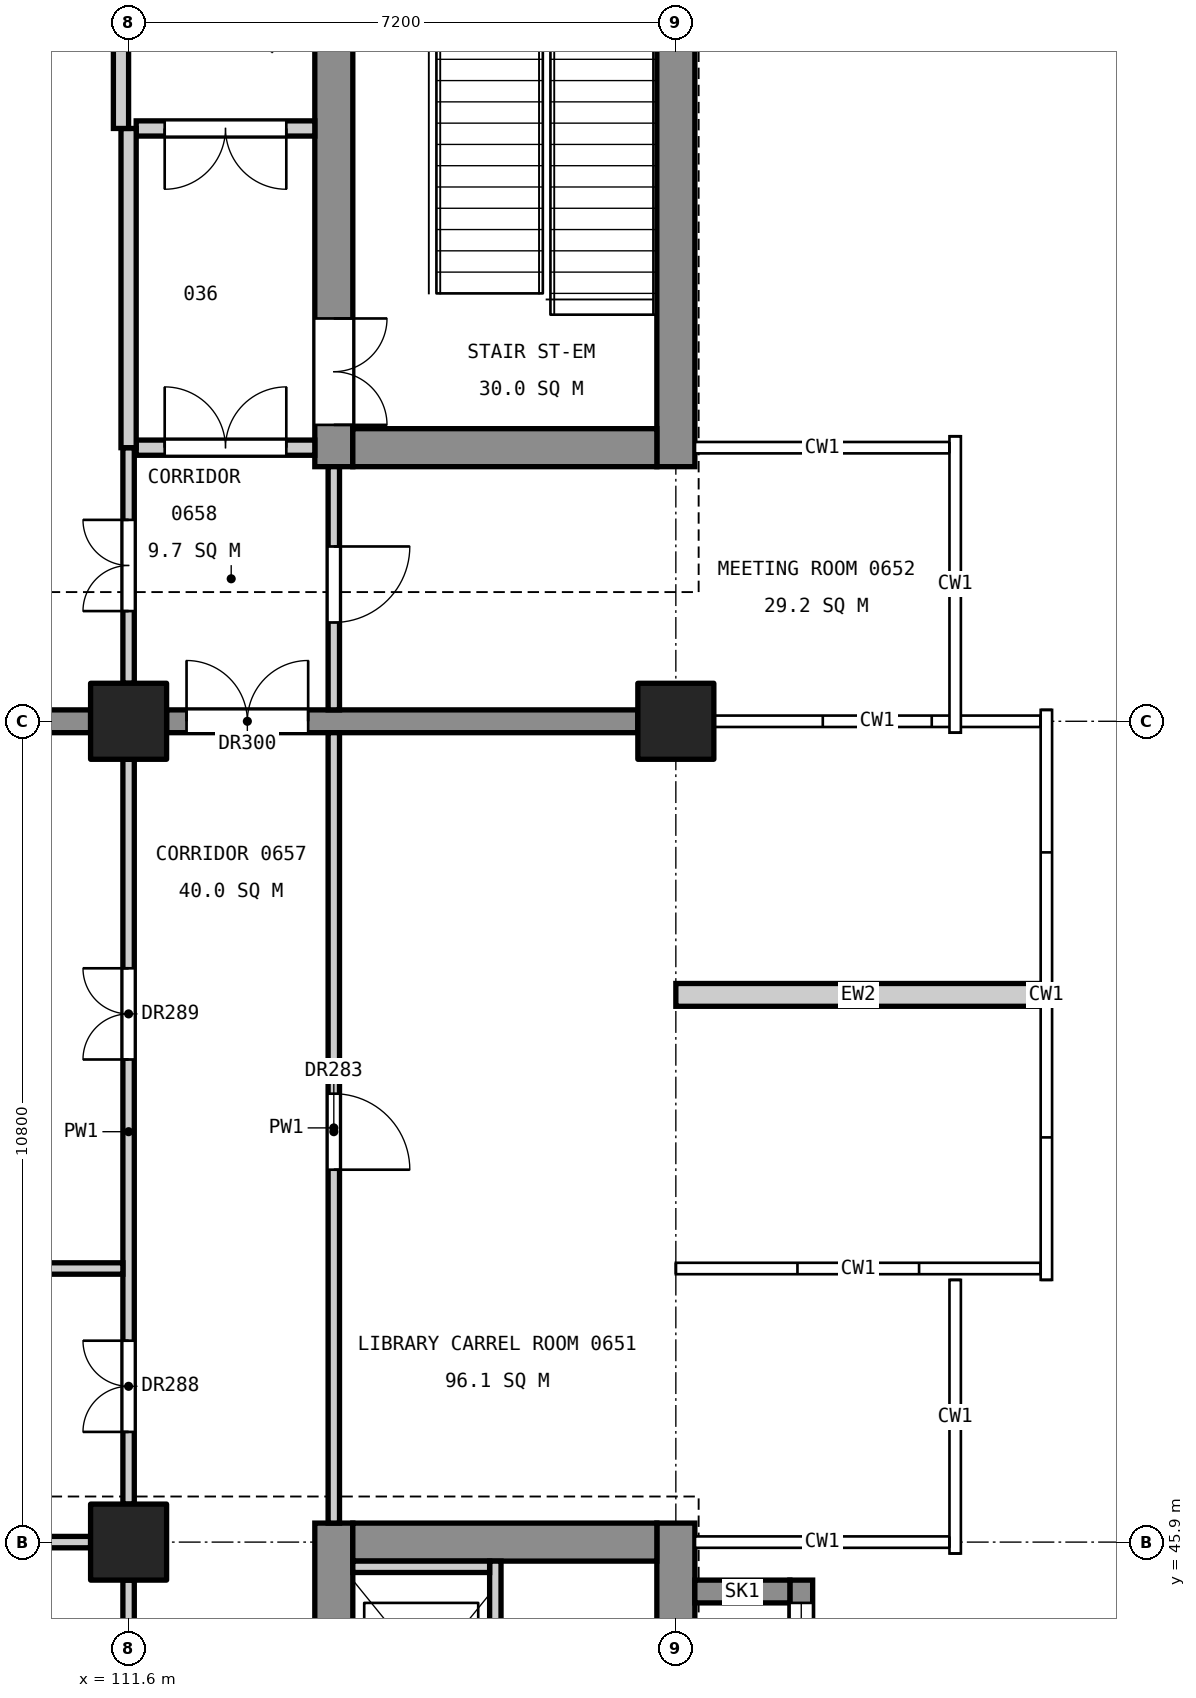
"""IFC4 building model, lengths in metres.
Left out: names, types, materials, properties, quantities, classifications, styles, units other than length and angle.
Written with IfcOpenShell. Run it as: python <this file> out.ifc"""

import sys

from ifc_helpers import new_model, si_unit, direction, frame, frame_2d, origin, origin_2d, place, context, subcontext, project, spatial, rectangle, extrude, element, fill, save


model = new_model("IFC4")
c1 = context("Model", 3, precision=1e-05, world=origin(), true_north=direction((0.0, 1.0)))
c2 = subcontext(c1, "Body", "Model", "MODEL_VIEW")
j1 = project(units=[si_unit("LENGTHUNIT", "METRE"), si_unit("PLANEANGLEUNIT", "RADIAN")], contexts=[c1])
p1 = place(None, origin())
s1 = spatial("IfcSite", under=j1, at=p1, CompositionType="ELEMENT")
p2 = place(p1, origin())
s2 = spatial("IfcBuilding", under=s1, at=p2, CompositionType="ELEMENT")
p3 = place(p2, frame((0.0, 0.0, 31.8)))
s3 = spatial("IfcBuildingStorey", under=s2, at=p3, CompositionType="ELEMENT", Elevation=31.8)
for number, where, z_axis, x_axis in (
    (1, (118.8, 56.7, 0.0), (0.0, 0.0, 1.0), (1.0, 0.0, 0.0)),
    (2, (111.6, 45.9, 0.0), (0.0, 0.0, 1.0), (1.0, 0.0, 0.0)),
    (3, (111.6, 56.7, 0.0), (0.0, 0.0, 1.0), (1.0, 0.0, 0.0)),
):
    element("IfcColumn", number, at=place(p3, frame(where, z_axis=z_axis, x_axis=x_axis)), inside=s3, PredefinedType="COLUMN", context=c2, shape_type="SweptSolid", body=[
        extrude(rectangle(XDim=1.0, YDim=1.0, at=origin_2d()), origin(), (0.0, 0.0, 1.0), 4.8),
    ])
p4 = place(p3, frame((118.8, 34.85, 0.0), z_axis=(0.0, 0.0, 1.0), x_axis=(0.0, 1.0, 0.0)))
e4 = element("IfcWall", 4, at=p4, inside=s3, PredefinedType="SHEAR", context=c2, shape_type="SweptSolid", body=[
    extrude(rectangle(XDim=11.3, YDim=0.5, at=frame_2d((5.65, 0.0))), origin(), (0.0, 0.0, 1.0), 4.55),
])
p5 = place(p4, frame((6.16, 0.0, 3.4)))
e5 = element("IfcOpeningElement", 5, at=p5, cuts=e4, PredefinedType="OPENING", context=c2, shape_type="SweptSolid", body=[
    extrude(rectangle(XDim=1.2, YDim=0.9, at=frame_2d((0.6, 0.45))), frame((0.0, 0.26, 0.0), z_axis=(0.0, -1.0, 0.0), x_axis=(1.0, 0.0, 0.0)), (0.0, 0.0, 1.0), 0.52),
])
p6 = place(p3, frame((114.3, 34.85, 0.0), z_axis=(0.0, 0.0, 1.0), x_axis=(0.0, 1.0, 0.0)))
e6 = element("IfcWall", 6, at=p6, inside=s3, PredefinedType="SHEAR", context=c2, shape_type="SweptSolid", body=[
    extrude(rectangle(XDim=11.3, YDim=0.5, at=frame_2d((5.65, 0.0))), origin(), (0.0, 0.0, 1.0), 4.55),
])
p7 = place(p6, frame((0.55, 0.0, 0.0)))
e7 = element("IfcOpeningElement", 7, at=p7, cuts=e6, PredefinedType="OPENING", context=c2, shape_type="SweptSolid", body=[
    extrude(rectangle(XDim=1.4, YDim=2.1, at=frame_2d((0.7, 1.05))), frame((0.0, 0.26, 0.0), z_axis=(0.0, -1.0, 0.0), x_axis=(1.0, 0.0, 0.0)), (0.0, 0.0, 1.0), 0.52),
])
p8 = place(p6, frame((8.8, 0.0, 0.0)))
e8 = element("IfcOpeningElement", 8, at=p8, cuts=e6, PredefinedType="OPENING", context=c2, shape_type="SweptSolid", body=[
    extrude(rectangle(XDim=1.1, YDim=2.1, at=frame_2d((0.55, 1.05))), frame((0.0, 0.26, 0.0), z_axis=(0.0, -1.0, 0.0), x_axis=(1.0, 0.0, 0.0)), (0.0, 0.0, 1.0), 0.52),
])
p9 = place(p3, frame((118.55, 45.9, 0.0), z_axis=(0.0, 0.0, 1.0), x_axis=(-1.0, 0.0, 0.0)))
e9 = element("IfcWall", 9, at=p9, inside=s3, PredefinedType="SHEAR", context=c2, shape_type="SweptSolid", body=[
    extrude(rectangle(XDim=4.0, YDim=0.5, at=frame_2d((2.0, 0.0))), origin(), (0.0, 0.0, 1.0), 4.55),
])
p10 = place(p3, frame((118.8, 60.05, 0.0), z_axis=(0.0, 0.0, 1.0), x_axis=(0.0, 1.0, 0.0)))
e10 = element("IfcWall", 10, at=p10, inside=s3, PredefinedType="SHEAR", context=c2, shape_type="SweptSolid", body=[
    extrude(rectangle(XDim=14.9, YDim=0.5, at=frame_2d((7.45, 0.0))), origin(), (0.0, 0.0, 1.0), 4.55),
])
p11 = place(p10, frame((6.16, 0.0, 3.4)))
e11 = element("IfcOpeningElement", 11, at=p11, cuts=e10, PredefinedType="OPENING", context=c2, shape_type="SweptSolid", body=[
    extrude(rectangle(XDim=1.2, YDim=0.9, at=frame_2d((0.6, 0.45))), frame((0.0, 0.26, 0.0), z_axis=(0.0, -1.0, 0.0), x_axis=(1.0, 0.0, 0.0)), (0.0, 0.0, 1.0), 0.52),
])
p12 = place(p3, frame((114.3, 60.05, 0.0), z_axis=(0.0, 0.0, 1.0), x_axis=(0.0, 1.0, 0.0)))
e12 = element("IfcWall", 12, at=p12, inside=s3, PredefinedType="SHEAR", context=c2, shape_type="SweptSolid", body=[
    extrude(rectangle(XDim=14.9, YDim=0.5, at=frame_2d((7.45, 0.0))), origin(), (0.0, 0.0, 1.0), 4.55),
])
p13 = place(p12, frame((0.55, 0.0, 0.0)))
e13 = element("IfcOpeningElement", 13, at=p13, cuts=e12, PredefinedType="OPENING", context=c2, shape_type="SweptSolid", body=[
    extrude(rectangle(XDim=1.4, YDim=2.1, at=frame_2d((0.7, 1.05))), frame((0.0, 0.26, 0.0), z_axis=(0.0, -1.0, 0.0), x_axis=(1.0, 0.0, 0.0)), (0.0, 0.0, 1.0), 0.52),
])
p14 = place(p12, frame((8.85, 0.0, 0.0)))
e14 = element("IfcOpeningElement", 14, at=p14, cuts=e12, PredefinedType="OPENING", context=c2, shape_type="SweptSolid", body=[
    extrude(rectangle(XDim=1.1, YDim=2.1, at=frame_2d((0.55, 1.05))), frame((0.0, 0.26, 0.0), z_axis=(0.0, -1.0, 0.0), x_axis=(1.0, 0.0, 0.0)), (0.0, 0.0, 1.0), 0.52),
])
p15 = place(p12, frame((11.4, 0.0, 0.0)))
e15 = element("IfcOpeningElement", 15, at=p15, cuts=e12, PredefinedType="OPENING", context=c2, shape_type="SweptSolid", body=[
    extrude(rectangle(XDim=1.1, YDim=2.1, at=frame_2d((0.55, 1.05))), frame((0.0, 0.26, 0.0), z_axis=(0.0, -1.0, 0.0), x_axis=(1.0, 0.0, 0.0)), (0.0, 0.0, 1.0), 0.52),
])
p16 = place(p3, frame((118.55, 60.3, 0.0), z_axis=(0.0, 0.0, 1.0), x_axis=(-1.0, 0.0, 0.0)))
e16 = element("IfcWall", 16, at=p16, inside=s3, PredefinedType="SHEAR", context=c2, shape_type="SweptSolid", body=[
    extrude(rectangle(XDim=4.0, YDim=0.5, at=frame_2d((2.0, 0.0))), origin(), (0.0, 0.0, 1.0), 4.55),
])
p17 = place(p3, frame((120.45, 43.0, 0.0), z_axis=(0.0, 0.0, 1.0), x_axis=(0.0, 1.0, 0.0)))
e17 = element("IfcWall", 17, at=p17, inside=s3, PredefinedType="SHEAR", context=c2, shape_type="SweptSolid", body=[
    extrude(rectangle(XDim=2.4, YDim=0.3, at=frame_2d((1.2, 0.0))), origin(), (0.0, 0.0, 1.0), 4.8),
])
p18 = place(p17, frame((0.3, 0.0, 3.0)))
e18 = element("IfcOpeningElement", 18, at=p18, cuts=e17, PredefinedType="OPENING", context=c2, shape_type="SweptSolid", body=[
    extrude(rectangle(XDim=1.8, YDim=1.2, at=frame_2d((0.9, 0.6))), frame((0.0, 0.16, 0.0), z_axis=(0.0, -1.0, 0.0), x_axis=(1.0, 0.0, 0.0)), (0.0, 0.0, 1.0), 0.32),
])
p19 = place(p3, frame((119.05, 45.25, 0.0), z_axis=(0.0, 0.0, 1.0), x_axis=(1.0, 0.0, 0.0)))
e19 = element("IfcWall", 19, at=p19, inside=s3, PredefinedType="SHEAR", context=c2, shape_type="SweptSolid", body=[
    extrude(rectangle(XDim=1.25, YDim=0.3, at=frame_2d((0.625, 0.0))), origin(), (0.0, 0.0, 1.0), 4.8),
])
p20 = place(p3, frame((118.3, 56.7, 0.0), z_axis=(0.0, 0.0, 1.0), x_axis=(-1.0, 0.0, 0.0)))
e20 = element("IfcWall", 20, at=p20, inside=s3, PredefinedType="SHEAR", context=c2, shape_type="SweptSolid", body=[
    extrude(rectangle(XDim=6.2, YDim=0.3, at=frame_2d((3.1, 0.0))), origin(), (0.0, 0.0, 1.0), 4.55),
])
p21 = place(p20, frame((4.337, 0.0, 0.0)))
e21 = element("IfcOpeningElement", 21, at=p21, cuts=e20, PredefinedType="OPENING", context=c2, shape_type="SweptSolid", body=[
    extrude(rectangle(XDim=1.6, YDim=2.1, at=frame_2d((0.8, 1.05))), frame((0.0, 0.16, 0.0), z_axis=(0.0, -1.0, 0.0), x_axis=(1.0, 0.0, 0.0)), (0.0, 0.0, 1.0), 0.32),
])
p22 = place(p3, frame((111.1, 56.7, 0.0), z_axis=(0.0, 0.0, 1.0), x_axis=(-1.0, 0.0, 0.0)))
e22 = element("IfcWall", 22, at=p22, inside=s3, PredefinedType="SHEAR", context=c2, shape_type="SweptSolid", body=[
    extrude(rectangle(XDim=9.8, YDim=0.3, at=frame_2d((4.9, 0.0))), origin(), (0.0, 0.0, 1.0), 4.55),
])
p23 = place(p3, frame((116.425, 43.0, 0.0), z_axis=(0.0, 0.0, 1.0), x_axis=(0.0, 1.0, 0.0)))
e23 = element("IfcWall", 23, at=p23, inside=s3, PredefinedType="SOLIDWALL", context=c2, shape_type="SweptSolid", body=[
    extrude(rectangle(XDim=2.65, YDim=0.15, at=frame_2d((1.325, 0.0))), origin(), (0.0, 0.0, 1.0), 4.8),
])
p24 = place(p3, frame((116.35, 45.575, 0.0), z_axis=(0.0, 0.0, 1.0), x_axis=(-1.0, 0.0, 0.0)))
e24 = element("IfcWall", 24, at=p24, inside=s3, PredefinedType="SOLIDWALL", context=c2, shape_type="SweptSolid", body=[
    extrude(rectangle(XDim=1.8, YDim=0.15, at=frame_2d((0.9, 0.0))), origin(), (0.0, 0.0, 1.0), 4.8),
])
p25 = place(p3, frame((123.6, 53.1, 0.0), z_axis=(0.0, 0.0, 1.0), x_axis=(-1.0, 0.0, 0.0)))
e25 = element("IfcWall", 25, at=p25, inside=s3, PredefinedType="STANDARD", context=c2, shape_type="SweptSolid", body=[
    extrude(rectangle(XDim=4.8, YDim=0.3, at=frame_2d((2.4, 0.0))), origin(), (0.0, 0.0, 1.0), 3.65),
])
p26 = place(p3, frame((114.3, 46.15, 0.0), z_axis=(0.0, 0.0, 1.0), x_axis=(0.0, 1.0, 0.0)))
e26 = element("IfcWall", 26, at=p26, inside=s3, PredefinedType="PARTITIONING", context=c2, shape_type="SweptSolid", body=[
    extrude(rectangle(XDim=10.4, YDim=0.15, at=frame_2d((5.2, 0.0))), origin(), (0.0, 0.0, 1.0), 3.55),
])
p27 = place(p26, frame((4.65, 0.0, 0.0)))
e27 = element("IfcOpeningElement", 27, at=p27, cuts=e26, PredefinedType="OPENING", context=c2, shape_type="SweptSolid", body=[
    extrude(rectangle(XDim=1.0, YDim=2.1, at=frame_2d((0.5, 1.05))), frame((0.0, 0.085, 0.0), z_axis=(0.0, -1.0, 0.0), x_axis=(1.0, 0.0, 0.0)), (0.0, 0.0, 1.0), 0.17),
])
p28 = place(p3, frame((114.3, 56.85, 0.0), z_axis=(0.0, 0.0, 1.0), x_axis=(0.0, 1.0, 0.0)))
e28 = element("IfcWall", 28, at=p28, inside=s3, PredefinedType="PARTITIONING", context=c2, shape_type="SweptSolid", body=[
    extrude(rectangle(XDim=3.2, YDim=0.15, at=frame_2d((1.6, 0.0))), origin(), (0.0, 0.0, 1.0), 3.55),
])
p29 = place(p28, frame((1.15, 0.0, 0.0)))
e29 = element("IfcOpeningElement", 29, at=p29, cuts=e28, PredefinedType="OPENING", context=c2, shape_type="SweptSolid", body=[
    extrude(rectangle(XDim=1.0, YDim=2.1, at=frame_2d((0.5, 1.05))), frame((0.0, 0.085, 0.0), z_axis=(0.0, -1.0, 0.0), x_axis=(1.0, 0.0, 0.0)), (0.0, 0.0, 1.0), 0.17),
])
p30 = place(p3, frame((114.05, 60.3, 0.0), z_axis=(0.0, 0.0, 1.0), x_axis=(-1.0, 0.0, 0.0)))
e30 = element("IfcWall", 30, at=p30, inside=s3, PredefinedType="PARTITIONING", context=c2, shape_type="SweptSolid", body=[
    extrude(rectangle(XDim=2.35, YDim=0.2, at=frame_2d((1.175, 0.0))), origin(), (0.0, 0.0, 1.0), 3.85),
])
p31 = place(p30, frame((0.375, 0.0, 0.0)))
e31 = element("IfcOpeningElement", 31, at=p31, cuts=e30, PredefinedType="OPENING", context=c2, shape_type="SweptSolid", body=[
    extrude(rectangle(XDim=1.6, YDim=2.1, at=frame_2d((0.8, 1.05))), frame((0.0, 0.11, 0.0), z_axis=(0.0, -1.0, 0.0), x_axis=(1.0, 0.0, 0.0)), (0.0, 0.0, 1.0), 0.22),
])
p32 = place(p3, frame((114.05, 64.5, 0.0), z_axis=(0.0, 0.0, 1.0), x_axis=(-1.0, 0.0, 0.0)))
e32 = element("IfcWall", 32, at=p32, inside=s3, PredefinedType="PARTITIONING", context=c2, shape_type="SweptSolid", body=[
    extrude(rectangle(XDim=2.35, YDim=0.2, at=frame_2d((1.175, 0.0))), origin(), (0.0, 0.0, 1.0), 3.55),
])
p33 = place(p32, frame((0.375, 0.0, 0.0)))
e33 = element("IfcOpeningElement", 33, at=p33, cuts=e32, PredefinedType="OPENING", context=c2, shape_type="SweptSolid", body=[
    extrude(rectangle(XDim=1.6, YDim=2.1, at=frame_2d((0.8, 1.05))), frame((0.0, 0.11, 0.0), z_axis=(0.0, -1.0, 0.0), x_axis=(1.0, 0.0, 0.0)), (0.0, 0.0, 1.0), 0.22),
])
p34 = place(p3, frame((111.6, 41.9, 0.0), z_axis=(0.0, 0.0, 1.0), x_axis=(0.0, 1.0, 0.0)))
e34 = element("IfcWall", 34, at=p34, inside=s3, PredefinedType="PARTITIONING", context=c2, shape_type="SweptSolid", body=[
    extrude(rectangle(XDim=3.5, YDim=0.15, at=frame_2d((1.75, 0.0))), origin(), (0.0, 0.0, 1.0), 3.55),
])
p35 = place(p34, frame((1.15, 0.0, 0.0)))
e35 = element("IfcOpeningElement", 35, at=p35, cuts=e34, PredefinedType="OPENING", context=c2, shape_type="SweptSolid", body=[
    extrude(rectangle(XDim=1.2, YDim=2.1, at=frame_2d((0.6, 1.05))), frame((0.0, 0.085, 0.0), z_axis=(0.0, -1.0, 0.0), x_axis=(1.0, 0.0, 0.0)), (0.0, 0.0, 1.0), 0.17),
])
p36 = place(p3, frame((111.6, 46.4, 0.0), z_axis=(0.0, 0.0, 1.0), x_axis=(0.0, 1.0, 0.0)))
e36 = element("IfcWall", 36, at=p36, inside=s3, PredefinedType="PARTITIONING", context=c2, shape_type="SweptSolid", body=[
    extrude(rectangle(XDim=9.8, YDim=0.15, at=frame_2d((4.9, 0.0))), origin(), (0.0, 0.0, 1.0), 3.55),
])
p37 = place(p36, frame((0.95, 0.0, 0.0)))
e37 = element("IfcOpeningElement", 37, at=p37, cuts=e36, PredefinedType="OPENING", context=c2, shape_type="SweptSolid", body=[
    extrude(rectangle(XDim=1.2, YDim=2.1, at=frame_2d((0.6, 1.05))), frame((0.0, 0.085, 0.0), z_axis=(0.0, -1.0, 0.0), x_axis=(1.0, 0.0, 0.0)), (0.0, 0.0, 1.0), 0.17),
])
p38 = place(p36, frame((5.85, 0.0, 0.0)))
e38 = element("IfcOpeningElement", 38, at=p38, cuts=e36, PredefinedType="OPENING", context=c2, shape_type="SweptSolid", body=[
    extrude(rectangle(XDim=1.2, YDim=2.1, at=frame_2d((0.6, 1.05))), frame((0.0, 0.085, 0.0), z_axis=(0.0, -1.0, 0.0), x_axis=(1.0, 0.0, 0.0)), (0.0, 0.0, 1.0), 0.17),
])
p39 = place(p3, frame((111.6, 57.2, 0.0), z_axis=(0.0, 0.0, 1.0), x_axis=(0.0, 1.0, 0.0)))
e39 = element("IfcWall", 39, at=p39, inside=s3, PredefinedType="PARTITIONING", context=c2, shape_type="SweptSolid", body=[
    extrude(rectangle(XDim=3.1, YDim=0.15, at=frame_2d((1.55, 0.0))), origin(), (0.0, 0.0, 1.0), 3.55),
])
p40 = place(p39, frame((0.95, 0.0, 0.0)))
e40 = element("IfcOpeningElement", 40, at=p40, cuts=e39, PredefinedType="OPENING", context=c2, shape_type="SweptSolid", body=[
    extrude(rectangle(XDim=1.2, YDim=2.1, at=frame_2d((0.6, 1.05))), frame((0.0, 0.085, 0.0), z_axis=(0.0, -1.0, 0.0), x_axis=(1.0, 0.0, 0.0)), (0.0, 0.0, 1.0), 0.17),
])
p41 = place(p3, frame((111.6, 60.3, 0.0), z_axis=(0.0, 0.0, 1.0), x_axis=(0.0, 1.0, 0.0)))
e41 = element("IfcWall", 41, at=p41, inside=s3, PredefinedType="PARTITIONING", context=c2, shape_type="SweptSolid", body=[
    extrude(rectangle(XDim=4.2, YDim=0.2, at=frame_2d((2.1, 0.0))), origin(), (0.0, 0.0, 1.0), 3.55),
])
p42 = place(p3, frame((111.5, 64.5, 0.0), z_axis=(0.0, 0.0, 1.0), x_axis=(0.0, 1.0, 0.0)))
e42 = element("IfcWall", 42, at=p42, inside=s3, PredefinedType="PARTITIONING", context=c2, shape_type="SweptSolid", body=[
    extrude(rectangle(XDim=2.5, YDim=0.2, at=frame_2d((1.25, 0.0))), origin(), (0.0, 0.0, 1.0), 3.55),
])
p43 = place(p3, frame((111.1, 45.9, 0.0), z_axis=(0.0, 0.0, 1.0), x_axis=(-1.0, 0.0, 0.0)))
e43 = element("IfcWall", 43, at=p43, inside=s3, PredefinedType="PARTITIONING", context=c2, shape_type="SweptSolid", body=[
    extrude(rectangle(XDim=9.8, YDim=0.15, at=frame_2d((4.9, 0.0))), origin(), (0.0, 0.0, 1.0), 3.85),
])
p44 = place(p3, frame((111.525, 49.5, 0.0), z_axis=(0.0, 0.0, 1.0), x_axis=(-1.0, 0.0, 0.0)))
e44 = element("IfcWall", 44, at=p44, inside=s3, PredefinedType="PARTITIONING", context=c2, shape_type="SweptSolid", body=[
    extrude(rectangle(XDim=10.575, YDim=0.15, at=frame_2d((5.288, 0.0))), origin(), (0.0, 0.0, 1.0), 3.85),
])
p45 = place(p13, frame((1.4, 0.0, 0.0), z_axis=(0.0, 0.0, 1.0), x_axis=(-1.0, 0.0, 0.0)))
e45 = element("IfcDoor", 45, at=p45, inside=s3, OperationType="DOUBLE_DOOR_SINGLE_SWING", PredefinedType="DOOR", context=c2, shape_type="SweptSolid", body=[
    extrude(rectangle(XDim=1.4, YDim=2.1, at=frame_2d((0.7, 1.05))), frame((0.0, 0.025, 0.0), z_axis=(0.0, -1.0, 0.0), x_axis=(1.0, 0.0, 0.0)), (0.0, 0.0, 1.0), 0.05),
])
fill(e13, e45)
p46 = place(p18, origin())
e46 = element("IfcWindow", 46, at=p46, inside=s3, PartitioningType="SINGLE_PANEL", PredefinedType="WINDOW", context=c2, shape_type="SweptSolid", body=[
    extrude(rectangle(XDim=1.8, YDim=1.2, at=frame_2d((0.9, 0.6))), frame((0.0, 0.03, 0.0), z_axis=(0.0, -1.0, 0.0), x_axis=(1.0, 0.0, 0.0)), (0.0, 0.0, 1.0), 0.06),
])
fill(e18, e46)
p47 = place(p27, frame((1.0, 0.0, 0.0), z_axis=(0.0, 0.0, 1.0), x_axis=(-1.0, 0.0, 0.0)))
e47 = element("IfcDoor", 47, at=p47, inside=s3, OperationType="SINGLE_SWING_RIGHT", PredefinedType="DOOR", context=c2, shape_type="SweptSolid", body=[
    extrude(rectangle(XDim=1.0, YDim=2.1, at=frame_2d((0.5, 1.05))), frame((0.0, 0.025, 0.0), z_axis=(0.0, -1.0, 0.0), x_axis=(1.0, 0.0, 0.0)), (0.0, 0.0, 1.0), 0.05),
])
fill(e27, e47)
p48 = place(p29, frame((1.0, 0.0, 0.0), z_axis=(0.0, 0.0, 1.0), x_axis=(-1.0, 0.0, 0.0)))
e48 = element("IfcDoor", 48, at=p48, inside=s3, OperationType="SINGLE_SWING_LEFT", PredefinedType="DOOR", context=c2, shape_type="SweptSolid", body=[
    extrude(rectangle(XDim=1.0, YDim=2.1, at=frame_2d((0.5, 1.05))), frame((0.0, 0.025, 0.0), z_axis=(0.0, -1.0, 0.0), x_axis=(1.0, 0.0, 0.0)), (0.0, 0.0, 1.0), 0.05),
])
fill(e29, e48)
p49 = place(p37, origin())
e49 = element("IfcDoor", 49, at=p49, inside=s3, OperationType="DOUBLE_DOOR_SINGLE_SWING", PredefinedType="DOOR", context=c2, shape_type="SweptSolid", body=[
    extrude(rectangle(XDim=1.2, YDim=2.1, at=frame_2d((0.6, 1.05))), frame((0.0, 0.025, 0.0), z_axis=(0.0, -1.0, 0.0), x_axis=(1.0, 0.0, 0.0)), (0.0, 0.0, 1.0), 0.05),
])
fill(e37, e49)
p50 = place(p38, origin())
e50 = element("IfcDoor", 50, at=p50, inside=s3, OperationType="DOUBLE_DOOR_SINGLE_SWING", PredefinedType="DOOR", context=c2, shape_type="SweptSolid", body=[
    extrude(rectangle(XDim=1.2, YDim=2.1, at=frame_2d((0.6, 1.05))), frame((0.0, 0.025, 0.0), z_axis=(0.0, -1.0, 0.0), x_axis=(1.0, 0.0, 0.0)), (0.0, 0.0, 1.0), 0.05),
])
fill(e38, e50)
p51 = place(p40, origin())
e51 = element("IfcDoor", 51, at=p51, inside=s3, OperationType="DOUBLE_DOOR_SINGLE_SWING", PredefinedType="DOOR", context=c2, shape_type="SweptSolid", body=[
    extrude(rectangle(XDim=1.2, YDim=2.1, at=frame_2d((0.6, 1.05))), frame((0.0, 0.025, 0.0), z_axis=(0.0, -1.0, 0.0), x_axis=(1.0, 0.0, 0.0)), (0.0, 0.0, 1.0), 0.05),
])
fill(e40, e51)
p52 = place(p31, frame((1.6, 0.0, 0.0), z_axis=(0.0, 0.0, 1.0), x_axis=(-1.0, 0.0, 0.0)))
e52 = element("IfcDoor", 52, at=p52, inside=s3, OperationType="DOUBLE_DOOR_SINGLE_SWING", PredefinedType="DOOR", context=c2, shape_type="SweptSolid", body=[
    extrude(rectangle(XDim=1.6, YDim=2.1, at=frame_2d((0.8, 1.05))), frame((0.0, 0.025, 0.0), z_axis=(0.0, -1.0, 0.0), x_axis=(1.0, 0.0, 0.0)), (0.0, 0.0, 1.0), 0.05),
])
fill(e31, e52)
p53 = place(p33, origin())
e53 = element("IfcDoor", 53, at=p53, inside=s3, OperationType="DOUBLE_DOOR_SINGLE_SWING", PredefinedType="DOOR", context=c2, shape_type="SweptSolid", body=[
    extrude(rectangle(XDim=1.6, YDim=2.1, at=frame_2d((0.8, 1.05))), frame((0.0, 0.025, 0.0), z_axis=(0.0, -1.0, 0.0), x_axis=(1.0, 0.0, 0.0)), (0.0, 0.0, 1.0), 0.05),
])
fill(e33, e53)
p54 = place(p21, frame((1.6, 0.0, 0.0), z_axis=(0.0, 0.0, 1.0), x_axis=(-1.0, 0.0, 0.0)))
e54 = element("IfcDoor", 54, at=p54, inside=s3, OperationType="DOUBLE_DOOR_SINGLE_SWING", PredefinedType="DOOR", context=c2, shape_type="SweptSolid", body=[
    extrude(rectangle(XDim=1.6, YDim=2.1, at=frame_2d((0.8, 1.05))), frame((0.0, 0.025, 0.0), z_axis=(0.0, -1.0, 0.0), x_axis=(1.0, 0.0, 0.0)), (0.0, 0.0, 1.0), 0.05),
])
fill(e21, e54)
save(model, sys.argv[1])
